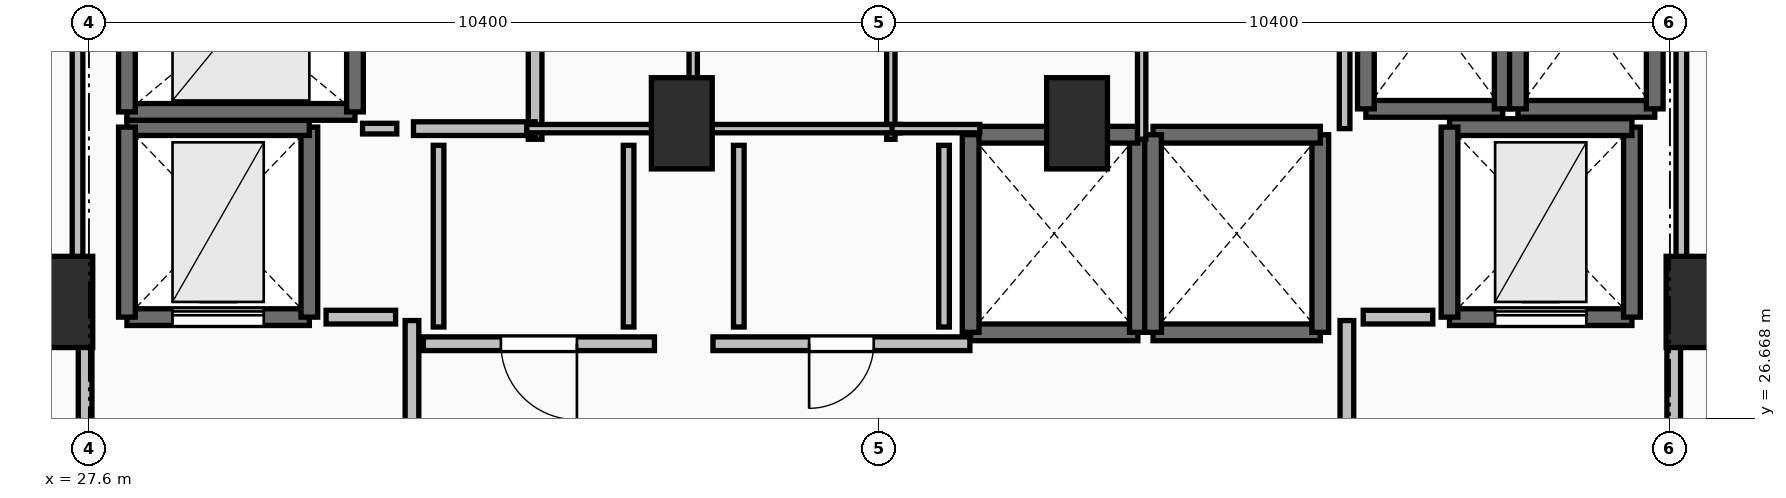
"""IFC4 building model, lengths in metres.
Left out: names, types, materials, properties, quantities, classifications, styles, units other than length and angle.
Written with IfcOpenShell. Run it as: python <this file> out.ifc"""

import sys

from ifc_helpers import new_model, si_unit, direction, frame, frame_2d, origin, origin_2d, place, context, subcontext, project, spatial, rectangle, extrude, element, fill, save


model = new_model("IFC4")
c1 = context("Model", 3, precision=1e-05, world=origin(), true_north=direction((0.0, 1.0)))
c2 = subcontext(c1, "Body", "Model", "MODEL_VIEW")
j1 = project(units=[si_unit("LENGTHUNIT", "METRE"), si_unit("PLANEANGLEUNIT", "RADIAN")], contexts=[c1])
p1 = place(None, origin())
s1 = spatial("IfcSite", under=j1, at=p1, CompositionType="ELEMENT")
p2 = place(p1, origin())
s2 = spatial("IfcBuilding", under=s1, at=p2, CompositionType="ELEMENT")
p3 = place(p2, frame((0.0, 0.0, 129.1)))
s3 = spatial("IfcBuildingStorey", under=s2, at=p3, CompositionType="ELEMENT", Elevation=129.1)
for number, where, z_axis, x_axis in (
    (1, (27.25, 28.2, 0.0), (0.0, 0.0, 1.0), (1.0, 0.0, 0.0)),
    (2, (48.75, 28.2, 0.0), (0.0, 0.0, 1.0), (1.0, 0.0, 0.0)),
    (3, (35.4, 30.55, 0.0), (0.0, 0.0, 1.0), (1.0, 0.0, 0.0)),
    (4, (40.6, 30.55, 0.0), (0.0, 0.0, 1.0), (1.0, 0.0, 0.0)),
):
    element("IfcColumn", number, at=place(p3, frame(where, z_axis=z_axis, x_axis=x_axis)), inside=s3, PredefinedType="PILASTER", context=c2, shape_type="SweptSolid", body=[
        extrude(rectangle(XDim=0.8, YDim=1.2, at=origin_2d()), origin(), (0.0, 0.0, 1.0), 3.5),
    ])
p4 = place(p3, frame((39.2, 27.8, 0.0), z_axis=(0.0, 0.0, 1.0), x_axis=(1.0, 0.0, 0.0)))
e5 = element("IfcWall", 5, at=p4, inside=s3, PredefinedType="SOLIDWALL", context=c2, shape_type="SweptSolid", body=[
    extrude(rectangle(XDim=2.2, YDim=0.22, at=frame_2d((1.1, 0.0))), origin(), (0.0, 0.0, 1.0), 3.24),
])
p5 = place(p3, frame((41.4, 27.8, 0.0), z_axis=(0.0, 0.0, 1.0), x_axis=(0.0, 1.0, 0.0)))
e6 = element("IfcWall", 6, at=p5, inside=s3, PredefinedType="SOLIDWALL", context=c2, shape_type="SweptSolid", body=[
    extrude(rectangle(XDim=2.6, YDim=0.22, at=frame_2d((1.3, 0.0))), origin(), (0.0, 0.0, 1.0), 3.24),
])
p6 = place(p3, frame((41.4, 30.4, 0.0), z_axis=(0.0, 0.0, 1.0), x_axis=(-1.0, 0.0, 0.0)))
e7 = element("IfcWall", 7, at=p6, inside=s3, PredefinedType="SOLIDWALL", context=c2, shape_type="SweptSolid", body=[
    extrude(rectangle(XDim=2.2, YDim=0.22, at=frame_2d((1.1, 0.0))), origin(), (0.0, 0.0, 1.0), 3.24),
])
p7 = place(p3, frame((39.2, 30.4, 0.0), z_axis=(0.0, 0.0, 1.0), x_axis=(0.0, -1.0, 0.0)))
e8 = element("IfcWall", 8, at=p7, inside=s3, PredefinedType="SOLIDWALL", context=c2, shape_type="SweptSolid", body=[
    extrude(rectangle(XDim=2.6, YDim=0.22, at=frame_2d((1.3, 0.0))), origin(), (0.0, 0.0, 1.0), 3.24),
])
p8 = place(p3, frame((41.6, 27.8, 0.0), z_axis=(0.0, 0.0, 1.0), x_axis=(1.0, 0.0, 0.0)))
e9 = element("IfcWall", 9, at=p8, inside=s3, PredefinedType="SOLIDWALL", context=c2, shape_type="SweptSolid", body=[
    extrude(rectangle(XDim=2.2, YDim=0.22, at=frame_2d((1.1, 0.0))), origin(), (0.0, 0.0, 1.0), 3.24),
])
p9 = place(p3, frame((43.8, 27.8, 0.0), z_axis=(0.0, 0.0, 1.0), x_axis=(0.0, 1.0, 0.0)))
e10 = element("IfcWall", 10, at=p9, inside=s3, PredefinedType="SOLIDWALL", context=c2, shape_type="SweptSolid", body=[
    extrude(rectangle(XDim=2.6, YDim=0.22, at=frame_2d((1.3, 0.0))), origin(), (0.0, 0.0, 1.0), 3.24),
])
p10 = place(p3, frame((43.8, 30.4, 0.0), z_axis=(0.0, 0.0, 1.0), x_axis=(-1.0, 0.0, 0.0)))
e11 = element("IfcWall", 11, at=p10, inside=s3, PredefinedType="SOLIDWALL", context=c2, shape_type="SweptSolid", body=[
    extrude(rectangle(XDim=2.2, YDim=0.22, at=frame_2d((1.1, 0.0))), origin(), (0.0, 0.0, 1.0), 3.24),
])
p11 = place(p3, frame((41.6, 30.4, 0.0), z_axis=(0.0, 0.0, 1.0), x_axis=(0.0, -1.0, 0.0)))
e12 = element("IfcWall", 12, at=p11, inside=s3, PredefinedType="SOLIDWALL", context=c2, shape_type="SweptSolid", body=[
    extrude(rectangle(XDim=2.6, YDim=0.22, at=frame_2d((1.3, 0.0))), origin(), (0.0, 0.0, 1.0), 3.24),
])
p12 = place(p3, frame((44.4, 30.74, 0.0), z_axis=(0.0, 0.0, 1.0), x_axis=(1.0, 0.0, 0.0)))
e13 = element("IfcWall", 13, at=p12, inside=s3, PredefinedType="SOLIDWALL", context=c2, shape_type="SweptSolid", body=[
    extrude(rectangle(XDim=1.8, YDim=0.22, at=frame_2d((0.9, 0.0))), origin(), (0.0, 0.0, 1.0), 3.24),
])
for number, where, z_axis, x_axis in (
    (14, (46.2, 30.74, 0.0), (0.0, 0.0, 1.0), (0.0, 1.0, 0.0)),
    (15, (44.4, 33.16, 0.0), (0.0, 0.0, 1.0), (0.0, -1.0, 0.0)),
):
    element("IfcWall", number, at=place(p3, frame(where, z_axis=z_axis, x_axis=x_axis)), inside=s3, PredefinedType="SOLIDWALL", context=c2, shape_type="SweptSolid", body=[
        extrude(rectangle(XDim=2.42, YDim=0.22, at=frame_2d((1.21, 0.0))), origin(), (0.0, 0.0, 1.0), 3.24),
    ])
p13 = place(p3, frame((46.4, 30.74, 0.0), z_axis=(0.0, 0.0, 1.0), x_axis=(1.0, 0.0, 0.0)))
e16 = element("IfcWall", 16, at=p13, inside=s3, PredefinedType="SOLIDWALL", context=c2, shape_type="SweptSolid", body=[
    extrude(rectangle(XDim=1.8, YDim=0.22, at=frame_2d((0.9, 0.0))), origin(), (0.0, 0.0, 1.0), 3.24),
])
for number, where, z_axis, x_axis in (
    (17, (48.2, 30.74, 0.0), (0.0, 0.0, 1.0), (0.0, 1.0, 0.0)),
    (18, (46.4, 33.16, 0.0), (0.0, 0.0, 1.0), (0.0, -1.0, 0.0)),
):
    element("IfcWall", number, at=place(p3, frame(where, z_axis=z_axis, x_axis=x_axis)), inside=s3, PredefinedType="SOLIDWALL", context=c2, shape_type="SweptSolid", body=[
        extrude(rectangle(XDim=2.42, YDim=0.22, at=frame_2d((1.21, 0.0))), origin(), (0.0, 0.0, 1.0), 3.24),
    ])
p14 = place(p3, frame((28.1, 28.0, 0.0), z_axis=(0.0, 0.0, 1.0), x_axis=(1.0, 0.0, 0.0)))
e19 = element("IfcWall", 19, at=p14, inside=s3, PredefinedType="SHEAR", context=c2, shape_type="SweptSolid", body=[
    extrude(rectangle(XDim=2.4, YDim=0.22, at=frame_2d((1.2, 0.0))), origin(), (0.0, 0.0, 1.0), 3.24),
])
p15 = place(p14, frame((0.6, 0.0, 0.0)))
e20 = element("IfcOpeningElement", 20, at=p15, cuts=e19, PredefinedType="OPENING", context=c2, shape_type="SweptSolid", body=[
    extrude(rectangle(XDim=1.2, YDim=2.2, at=frame_2d((0.6, 1.1))), frame((0.0, 0.125, 0.0), z_axis=(0.0, -1.0, 0.0), x_axis=(1.0, 0.0, 0.0)), (0.0, 0.0, 1.0), 0.25),
])
p16 = place(p3, frame((30.5, 28.0, 0.0), z_axis=(0.0, 0.0, 1.0), x_axis=(0.0, 1.0, 0.0)))
e21 = element("IfcWall", 21, at=p16, inside=s3, PredefinedType="SHEAR", context=c2, shape_type="SweptSolid", body=[
    extrude(rectangle(XDim=2.5, YDim=0.22, at=frame_2d((1.25, 0.0))), origin(), (0.0, 0.0, 1.0), 3.24),
])
p17 = place(p3, frame((30.5, 30.5, 0.0), z_axis=(0.0, 0.0, 1.0), x_axis=(-1.0, 0.0, 0.0)))
e22 = element("IfcWall", 22, at=p17, inside=s3, PredefinedType="SHEAR", context=c2, shape_type="SweptSolid", body=[
    extrude(rectangle(XDim=2.4, YDim=0.22, at=frame_2d((1.2, 0.0))), origin(), (0.0, 0.0, 1.0), 3.24),
])
p18 = place(p3, frame((28.1, 30.5, 0.0), z_axis=(0.0, 0.0, 1.0), x_axis=(0.0, -1.0, 0.0)))
e23 = element("IfcWall", 23, at=p18, inside=s3, PredefinedType="SHEAR", context=c2, shape_type="SweptSolid", body=[
    extrude(rectangle(XDim=2.5, YDim=0.22, at=frame_2d((1.25, 0.0))), origin(), (0.0, 0.0, 1.0), 3.24),
])
p19 = place(p3, frame((45.5, 28.0, 0.0), z_axis=(0.0, 0.0, 1.0), x_axis=(1.0, 0.0, 0.0)))
e24 = element("IfcWall", 24, at=p19, inside=s3, PredefinedType="SHEAR", context=c2, shape_type="SweptSolid", body=[
    extrude(rectangle(XDim=2.4, YDim=0.22, at=frame_2d((1.2, 0.0))), origin(), (0.0, 0.0, 1.0), 3.24),
])
p20 = place(p19, frame((0.6, 0.0, 0.0)))
e25 = element("IfcOpeningElement", 25, at=p20, cuts=e24, PredefinedType="OPENING", context=c2, shape_type="SweptSolid", body=[
    extrude(rectangle(XDim=1.2, YDim=2.2, at=frame_2d((0.6, 1.1))), frame((0.0, 0.125, 0.0), z_axis=(0.0, -1.0, 0.0), x_axis=(1.0, 0.0, 0.0)), (0.0, 0.0, 1.0), 0.25),
])
p21 = place(p3, frame((47.9, 28.0, 0.0), z_axis=(0.0, 0.0, 1.0), x_axis=(0.0, 1.0, 0.0)))
e26 = element("IfcWall", 26, at=p21, inside=s3, PredefinedType="SHEAR", context=c2, shape_type="SweptSolid", body=[
    extrude(rectangle(XDim=2.5, YDim=0.22, at=frame_2d((1.25, 0.0))), origin(), (0.0, 0.0, 1.0), 3.24),
])
p22 = place(p3, frame((47.9, 30.5, 0.0), z_axis=(0.0, 0.0, 1.0), x_axis=(-1.0, 0.0, 0.0)))
e27 = element("IfcWall", 27, at=p22, inside=s3, PredefinedType="SHEAR", context=c2, shape_type="SweptSolid", body=[
    extrude(rectangle(XDim=2.4, YDim=0.22, at=frame_2d((1.2, 0.0))), origin(), (0.0, 0.0, 1.0), 3.24),
])
p23 = place(p3, frame((45.5, 30.5, 0.0), z_axis=(0.0, 0.0, 1.0), x_axis=(0.0, -1.0, 0.0)))
e28 = element("IfcWall", 28, at=p23, inside=s3, PredefinedType="SHEAR", context=c2, shape_type="SweptSolid", body=[
    extrude(rectangle(XDim=2.5, YDim=0.22, at=frame_2d((1.25, 0.0))), origin(), (0.0, 0.0, 1.0), 3.24),
])
p24 = place(p3, frame((28.1, 30.7, 0.0), z_axis=(0.0, 0.0, 1.0), x_axis=(1.0, 0.0, 0.0)))
e29 = element("IfcWall", 29, at=p24, inside=s3, PredefinedType="SOLIDWALL", context=c2, shape_type="SweptSolid", body=[
    extrude(rectangle(XDim=3.0, YDim=0.22, at=frame_2d((1.5, 0.0))), origin(), (0.0, 0.0, 1.0), 3.24),
])
for number, where, z_axis, x_axis in (
    (30, (31.1, 30.7, 0.0), (0.0, 0.0, 1.0), (0.0, 1.0, 0.0)),
    (31, (28.1, 33.2, 0.0), (0.0, 0.0, 1.0), (0.0, -1.0, 0.0)),
):
    element("IfcWall", number, at=place(p3, frame(where, z_axis=z_axis, x_axis=x_axis)), inside=s3, PredefinedType="SOLIDWALL", context=c2, shape_type="SweptSolid", body=[
        extrude(rectangle(XDim=2.5, YDim=0.22, at=frame_2d((1.25, 0.0))), origin(), (0.0, 0.0, 1.0), 3.24),
    ])
p25 = place(p3, frame((31.85, 24.045, 0.0), z_axis=(0.0, 0.0, 1.0), x_axis=(0.0, 1.0, 0.0)))
e32 = element("IfcWall", 32, at=p25, inside=s3, PredefinedType="PARTITIONING", context=c2, shape_type="SweptSolid", body=[
    extrude(rectangle(XDim=3.91, YDim=0.18, at=frame_2d((1.955, 0.0))), origin(), (0.0, 0.0, 1.0), 3.24),
])
p26 = place(p25, frame((1.355, 0.0, 0.0)))
e33 = element("IfcOpeningElement", 33, at=p26, cuts=e32, PredefinedType="OPENING", context=c2, shape_type="SweptSolid", body=[
    extrude(rectangle(XDim=1.2, YDim=2.15, at=frame_2d((0.6, 1.075))), frame((0.0, 0.105, 0.0), z_axis=(0.0, -1.0, 0.0), x_axis=(1.0, 0.0, 0.0)), (0.0, 0.0, 1.0), 0.21),
])
p27 = place(p3, frame((27.55, 28.0, 0.0), z_axis=(0.0, 0.0, 1.0), x_axis=(0.0, -1.0, 0.0)))
e34 = element("IfcWall", 34, at=p27, inside=s3, PredefinedType="PARTITIONING", context=c2, shape_type="SweptSolid", body=[
    extrude(rectangle(XDim=4.05, YDim=0.18, at=frame_2d((2.025, 0.0))), origin(), (0.0, 0.0, 1.0), 3.24),
])
p28 = place(p27, frame((1.425, 0.0, 0.0)))
e35 = element("IfcOpeningElement", 35, at=p28, cuts=e34, PredefinedType="OPENING", context=c2, shape_type="SweptSolid", body=[
    extrude(rectangle(XDim=1.2, YDim=2.15, at=frame_2d((0.6, 1.075))), frame((0.0, 0.105, 0.0), z_axis=(0.0, -1.0, 0.0), x_axis=(1.0, 0.0, 0.0)), (0.0, 0.0, 1.0), 0.21),
])
p29 = place(p3, frame((44.15, 27.955, 0.0), z_axis=(0.0, 0.0, 1.0), x_axis=(0.0, -1.0, 0.0)))
e36 = element("IfcWall", 36, at=p29, inside=s3, PredefinedType="PARTITIONING", context=c2, shape_type="SweptSolid", body=[
    extrude(rectangle(XDim=3.91, YDim=0.18, at=frame_2d((1.955, 0.0))), origin(), (0.0, 0.0, 1.0), 3.24),
])
p30 = place(p29, frame((1.355, 0.0, 0.0)))
e37 = element("IfcOpeningElement", 37, at=p30, cuts=e36, PredefinedType="OPENING", context=c2, shape_type="SweptSolid", body=[
    extrude(rectangle(XDim=1.2, YDim=2.15, at=frame_2d((0.6, 1.075))), frame((0.0, 0.105, 0.0), z_axis=(0.0, -1.0, 0.0), x_axis=(1.0, 0.0, 0.0)), (0.0, 0.0, 1.0), 0.21),
])
p31 = place(p3, frame((48.45, 23.95, 0.0), z_axis=(0.0, 0.0, 1.0), x_axis=(0.0, 1.0, 0.0)))
e38 = element("IfcWall", 38, at=p31, inside=s3, PredefinedType="PARTITIONING", context=c2, shape_type="SweptSolid", body=[
    extrude(rectangle(XDim=4.05, YDim=0.18, at=frame_2d((2.025, 0.0))), origin(), (0.0, 0.0, 1.0), 3.24),
])
p32 = place(p31, frame((1.425, 0.0, 0.0)))
e39 = element("IfcOpeningElement", 39, at=p32, cuts=e38, PredefinedType="OPENING", context=c2, shape_type="SweptSolid", body=[
    extrude(rectangle(XDim=1.2, YDim=2.15, at=frame_2d((0.6, 1.075))), frame((0.0, 0.105, 0.0), z_axis=(0.0, -1.0, 0.0), x_axis=(1.0, 0.0, 0.0)), (0.0, 0.0, 1.0), 0.21),
])
p33 = place(p3, frame((33.47, 30.34, 0.0), z_axis=(0.0, 0.0, 1.0), x_axis=(0.0, 1.0, 0.0)))
e40 = element("IfcWall", 40, at=p33, inside=s3, PredefinedType="PARTITIONING", context=c2, shape_type="SweptSolid", body=[
    extrude(rectangle(XDim=3.56, YDim=0.18, at=frame_2d((1.78, 0.0))), origin(), (0.0, 0.0, 1.0), 3.24),
])
p34 = place(p3, frame((31.87, 30.48, 0.0), z_axis=(0.0, 0.0, 1.0), x_axis=(1.0, 0.0, 0.0)))
e41 = element("IfcWall", 41, at=p34, inside=s3, PredefinedType="PARTITIONING", context=c2, shape_type="SweptSolid", body=[
    extrude(rectangle(XDim=1.6, YDim=0.18, at=frame_2d((0.8, 0.0))), origin(), (0.0, 0.0, 1.0), 3.24),
])
p35 = place(p3, frame((35.04, 27.65, 0.0), z_axis=(0.0, 0.0, 1.0), x_axis=(-1.0, 0.0, 0.0)))
e42 = element("IfcWall", 42, at=p35, inside=s3, PredefinedType="PARTITIONING", context=c2, shape_type="SweptSolid", body=[
    extrude(rectangle(XDim=3.04, YDim=0.18, at=frame_2d((1.52, 0.0))), origin(), (0.0, 0.0, 1.0), 3.24),
])
p36 = place(p35, frame((1.02, 0.0, 0.0)))
e43 = element("IfcOpeningElement", 43, at=p36, cuts=e42, PredefinedType="OPENING", context=c2, shape_type="SweptSolid", body=[
    extrude(rectangle(XDim=1.0, YDim=2.15, at=frame_2d((0.5, 1.075))), frame((0.0, 0.105, 0.0), z_axis=(0.0, -1.0, 0.0), x_axis=(1.0, 0.0, 0.0)), (0.0, 0.0, 1.0), 0.21),
])
p37 = place(p3, frame((39.19, 27.65, 0.0), z_axis=(0.0, 0.0, 1.0), x_axis=(-1.0, 0.0, 0.0)))
e44 = element("IfcWall", 44, at=p37, inside=s3, PredefinedType="PARTITIONING", context=c2, shape_type="SweptSolid", body=[
    extrude(rectangle(XDim=3.38, YDim=0.18, at=frame_2d((1.69, 0.0))), origin(), (0.0, 0.0, 1.0), 3.24),
])
p38 = place(p37, frame((1.265, 0.0, 0.0)))
e45 = element("IfcOpeningElement", 45, at=p38, cuts=e44, PredefinedType="OPENING", context=c2, shape_type="SweptSolid", body=[
    extrude(rectangle(XDim=0.85, YDim=2.1, at=frame_2d((0.425, 1.05))), frame((0.0, 0.105, 0.0), z_axis=(0.0, -1.0, 0.0), x_axis=(1.0, 0.0, 0.0)), (0.0, 0.0, 1.0), 0.21),
])
p39 = place(p3, frame((35.55, 30.34, 0.0), z_axis=(0.0, 0.0, 1.0), x_axis=(0.0, 1.0, 0.0)))
e46 = element("IfcWall", 46, at=p39, inside=s3, PredefinedType="PARTITIONING", context=c2, shape_type="SweptSolid", body=[
    extrude(rectangle(XDim=3.56, YDim=0.11, at=frame_2d((1.78, 0.0))), origin(), (0.0, 0.0, 1.0), 2.432),
])
p40 = place(p3, frame((33.36, 30.48, 0.0), z_axis=(0.0, 0.0, 1.0), x_axis=(1.0, 0.0, 0.0)))
e47 = element("IfcWall", 47, at=p40, inside=s3, PredefinedType="PARTITIONING", context=c2, shape_type="SweptSolid", body=[
    extrude(rectangle(XDim=1.81, YDim=0.11, at=frame_2d((0.905, 0.0))), origin(), (0.0, 0.0, 1.0), 3.24),
])
p41 = place(p3, frame((38.15, 30.34, 0.0), z_axis=(0.0, 0.0, 1.0), x_axis=(0.0, 1.0, 0.0)))
e48 = element("IfcWall", 48, at=p41, inside=s3, PredefinedType="PARTITIONING", context=c2, shape_type="SweptSolid", body=[
    extrude(rectangle(XDim=3.56, YDim=0.11, at=frame_2d((1.78, 0.0))), origin(), (0.0, 0.0, 1.0), 2.432),
])
p42 = place(p3, frame((35.68, 30.48, 0.0), z_axis=(0.0, 0.0, 1.0), x_axis=(1.0, 0.0, 0.0)))
e49 = element("IfcWall", 49, at=p42, inside=s3, PredefinedType="PARTITIONING", context=c2, shape_type="SweptSolid", body=[
    extrude(rectangle(XDim=2.595, YDim=0.11, at=frame_2d((1.297, 0.0))), origin(), (0.0, 0.0, 1.0), 2.432),
])
p43 = place(p3, frame((41.45, 30.34, 0.0), z_axis=(0.0, 0.0, 1.0), x_axis=(0.0, 1.0, 0.0)))
e50 = element("IfcWall", 50, at=p43, inside=s3, PredefinedType="PARTITIONING", context=c2, shape_type="SweptSolid", body=[
    extrude(rectangle(XDim=3.56, YDim=0.11, at=frame_2d((1.78, 0.0))), origin(), (0.0, 0.0, 1.0), 3.24),
])
p44 = place(p3, frame((38.165, 30.48, 0.0), z_axis=(0.0, 0.0, 1.0), x_axis=(1.0, 0.0, 0.0)))
e51 = element("IfcWall", 51, at=p44, inside=s3, PredefinedType="PARTITIONING", context=c2, shape_type="SweptSolid", body=[
    extrude(rectangle(XDim=1.155, YDim=0.11, at=frame_2d((0.578, 0.0))), origin(), (0.0, 0.0, 1.0), 2.432),
])
for number, where, z_axis, x_axis in (
    (52, (31.635, 28.0, 0.0), (0.0, 0.0, 1.0), (-1.0, 0.0, 0.0)),
    (53, (45.28, 28.0, 0.0), (0.0, 0.0, 1.0), (-1.0, 0.0, 0.0)),
):
    element("IfcWall", number, at=place(p3, frame(where, z_axis=z_axis, x_axis=x_axis)), inside=s3, PredefinedType="PARTITIONING", context=c2, shape_type="SweptSolid", body=[
        extrude(rectangle(XDim=0.915, YDim=0.18, at=frame_2d((0.458, 0.0))), origin(), (0.0, 0.0, 1.0), 3.24),
    ])
p45 = place(p3, frame((31.2, 30.48, 0.0), z_axis=(0.0, 0.0, 1.0), x_axis=(1.0, 0.0, 0.0)))
e54 = element("IfcWall", 54, at=p45, inside=s3, PredefinedType="PARTITIONING", context=c2, shape_type="SweptSolid", body=[
    extrude(rectangle(XDim=0.45, YDim=0.14, at=frame_2d((0.225, 0.0))), origin(), (0.0, 0.0, 1.0), 3.24),
])
p46 = place(p3, frame((44.12, 30.48, 0.0), z_axis=(0.0, 0.0, 1.0), x_axis=(0.0, 1.0, 0.0)))
e55 = element("IfcWall", 55, at=p46, inside=s3, PredefinedType="PARTITIONING", context=c2, shape_type="SweptSolid", body=[
    extrude(rectangle(XDim=2.41, YDim=0.14, at=frame_2d((1.205, 0.0))), origin(), (0.0, 0.0, 1.0), 3.24),
])
for number, where, z_axis, x_axis in (
    (56, (32.2, 30.26, 0.0), (0.0, 0.0, 1.0), (0.0, -1.0, 0.0)),
    (57, (34.7, 27.87, 0.0), (0.0, 0.0, 1.0), (0.0, 1.0, 0.0)),
    (58, (36.15, 30.26, 0.0), (0.0, 0.0, 1.0), (0.0, -1.0, 0.0)),
    (59, (38.85, 27.87, 0.0), (0.0, 0.0, 1.0), (0.0, 1.0, 0.0)),
):
    element("IfcWall", number, at=place(p3, frame(where, z_axis=z_axis, x_axis=x_axis)), inside=s3, PredefinedType="PARTITIONING", context=c2, shape_type="SweptSolid", body=[
        extrude(rectangle(XDim=2.39, YDim=0.14, at=frame_2d((1.195, 0.0))), origin(), (0.0, 0.0, 1.0), 3.24),
    ])
for number, where, z_axis, x_axis in (
    (60, (48.55, 28.196, 0.0), (0.0, 0.0, 1.0), (0.0, 1.0, 0.0)),
    (61, (27.45, 33.45, 0.0), (0.0, 0.0, 1.0), (0.0, -1.0, 0.0)),
):
    element("IfcWall", number, at=place(p3, frame(where, z_axis=z_axis, x_axis=x_axis)), inside=s3, PredefinedType="PARTITIONING", context=c2, shape_type="SweptSolid", body=[
        extrude(rectangle(XDim=5.254, YDim=0.14, at=frame_2d((2.627, 0.0))), origin(), (0.0, 0.0, 1.0), 2.432),
    ])
p47 = place(p15, origin())
e62 = element("IfcDoor", 62, at=p47, inside=s3, OperationType="SLIDING_TO_LEFT", PredefinedType="DOOR", context=c2, shape_type="SweptSolid", body=[
    extrude(rectangle(XDim=1.2, YDim=2.2, at=frame_2d((0.6, 1.1))), frame((0.0, 0.025, 0.0), z_axis=(0.0, -1.0, 0.0), x_axis=(1.0, 0.0, 0.0)), (0.0, 0.0, 1.0), 0.05),
])
fill(e20, e62)
p48 = place(p20, origin())
e63 = element("IfcDoor", 63, at=p48, inside=s3, OperationType="SLIDING_TO_LEFT", PredefinedType="DOOR", context=c2, shape_type="SweptSolid", body=[
    extrude(rectangle(XDim=1.2, YDim=2.2, at=frame_2d((0.6, 1.1))), frame((0.0, 0.025, 0.0), z_axis=(0.0, -1.0, 0.0), x_axis=(1.0, 0.0, 0.0)), (0.0, 0.0, 1.0), 0.05),
])
fill(e25, e63)
p49 = place(p36, origin())
e64 = element("IfcDoor", 64, at=p49, inside=s3, OperationType="SINGLE_SWING_LEFT", PredefinedType="DOOR", context=c2, shape_type="SweptSolid", body=[
    extrude(rectangle(XDim=1.0, YDim=2.15, at=frame_2d((0.5, 1.075))), frame((0.0, 0.025, 0.0), z_axis=(0.0, -1.0, 0.0), x_axis=(1.0, 0.0, 0.0)), (0.0, 0.0, 1.0), 0.05),
])
fill(e43, e64)
p50 = place(p38, origin())
e65 = element("IfcDoor", 65, at=p50, inside=s3, OperationType="SINGLE_SWING_RIGHT", PredefinedType="DOOR", context=c2, shape_type="SweptSolid", body=[
    extrude(rectangle(XDim=0.85, YDim=2.1, at=frame_2d((0.425, 1.05))), frame((0.0, 0.025, 0.0), z_axis=(0.0, -1.0, 0.0), x_axis=(1.0, 0.0, 0.0)), (0.0, 0.0, 1.0), 0.05),
])
fill(e45, e65)
save(model, sys.argv[1])
